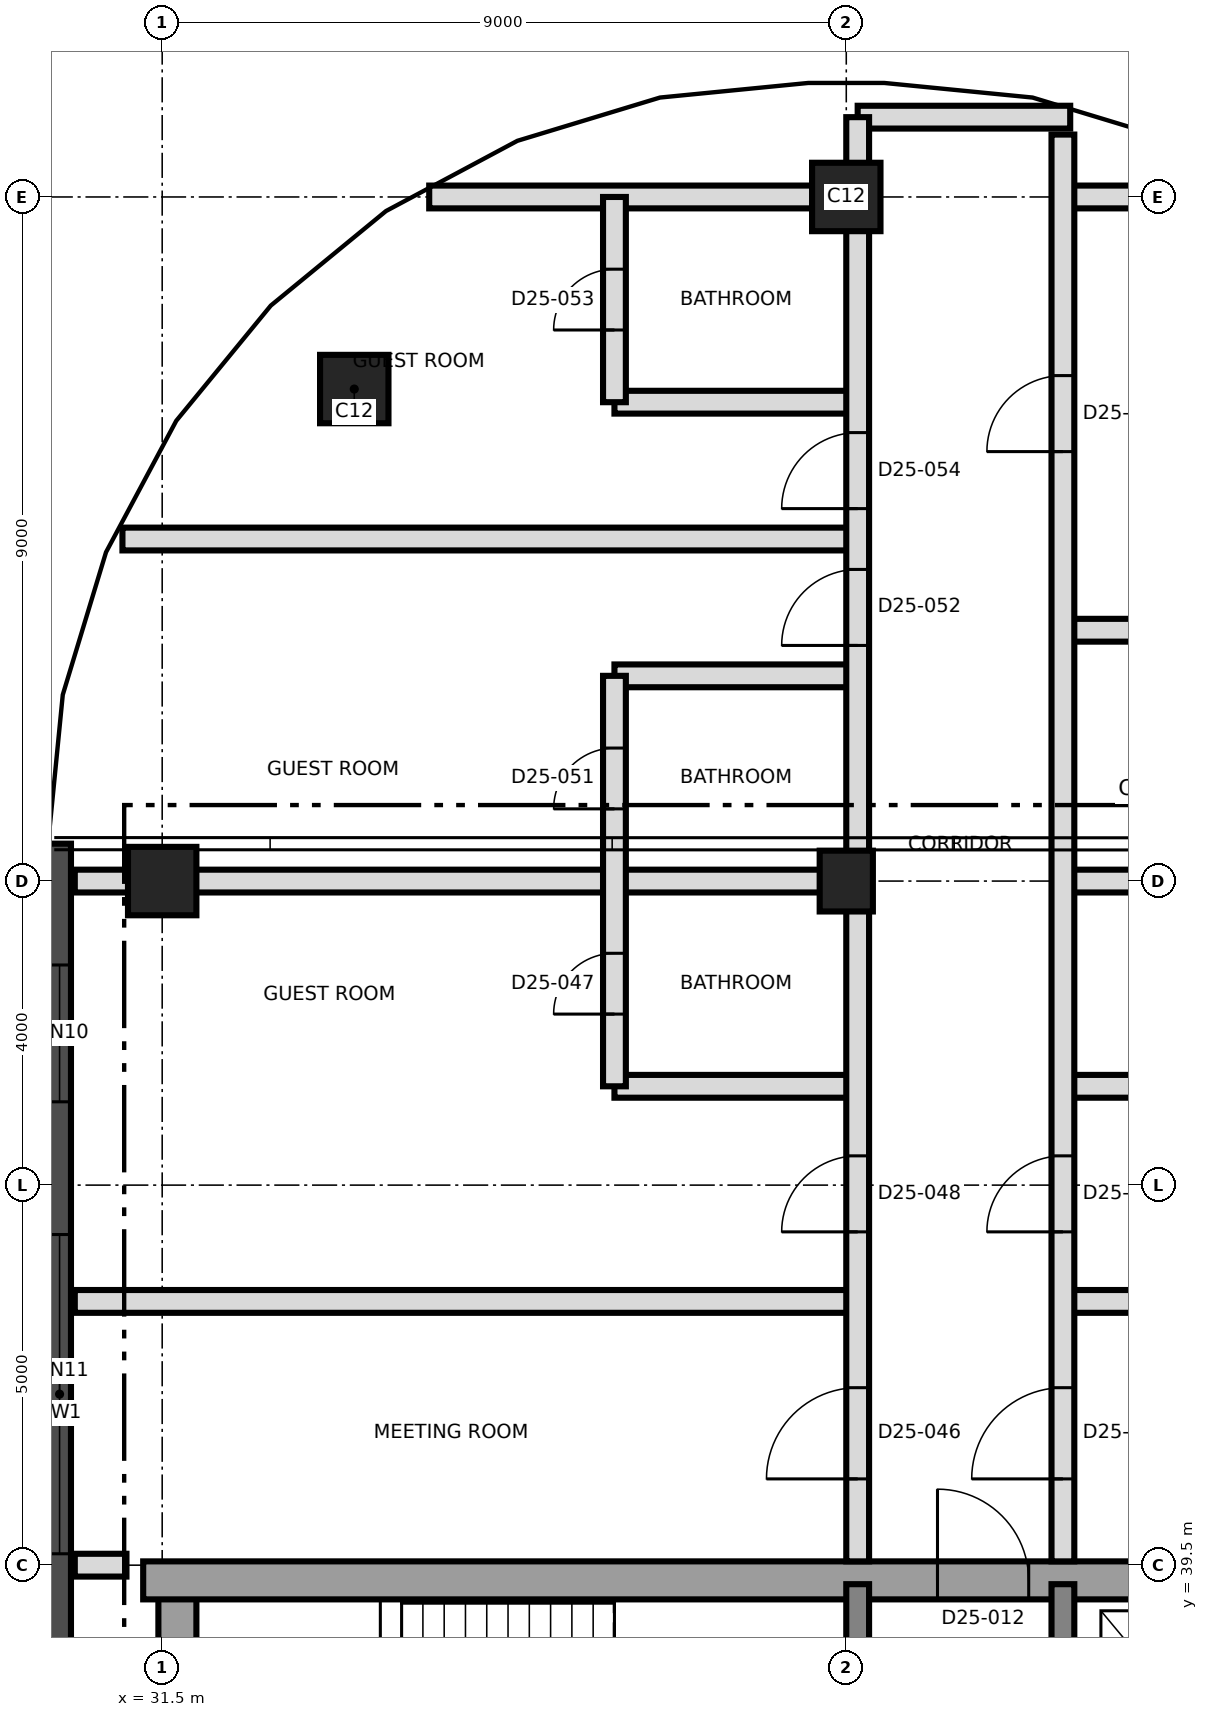
"""IFC4 building model, lengths in metres.
Left out: names, types, materials, properties, quantities, classifications, styles, units other than length and angle.
Written with IfcOpenShell. Run it as: python <this file> out.ifc"""

import sys

from ifc_helpers import new_model, si_unit, direction, frame, frame_2d, origin, origin_2d, place, context, subcontext, project, spatial, rectangle, extrude, element, fill, save


model = new_model("IFC4")
c1 = context("Model", 3, precision=1e-05, world=origin(), true_north=direction((0.0, 1.0)))
c2 = subcontext(c1, "Body", "Model", "MODEL_VIEW")
j1 = project(units=[si_unit("LENGTHUNIT", "METRE"), si_unit("PLANEANGLEUNIT", "RADIAN")], contexts=[c1])
p1 = place(None, origin())
s1 = spatial("IfcSite", under=j1, at=p1, CompositionType="ELEMENT")
p2 = place(p1, origin())
s2 = spatial("IfcBuilding", under=s1, at=p2, CompositionType="ELEMENT")
p3 = place(p2, frame((0.0, 0.0, 225.4)))
s3 = spatial("IfcBuildingStorey", under=s2, at=p3, CompositionType="ELEMENT", Elevation=225.4)
p4 = place(p3, frame((31.7, 21.75, 0.0), z_axis=(0.0, 0.0, 1.0), x_axis=(0.0, 1.0, 0.0)))
e1 = element("IfcWall", 1, at=p4, inside=s3, PredefinedType="SHEAR", context=c2, shape_type="SweptSolid", body=[
    extrude(rectangle(XDim=17.5, YDim=0.5, at=frame_2d((8.75, 0.0))), origin(), (0.0, 0.0, 1.0), 3.7),
])
p5 = place(p3, frame((31.25, 39.3, 0.0), z_axis=(0.0, 0.0, 1.0), x_axis=(1.0, 0.0, 0.0)))
e2 = element("IfcWall", 2, at=p5, inside=s3, PredefinedType="SHEAR", context=c2, shape_type="SweptSolid", body=[
    extrude(rectangle(XDim=27.0, YDim=0.5, at=frame_2d((13.5, 0.0))), origin(), (0.0, 0.0, 1.0), 3.7),
])
p6 = place(p5, frame((10.45, 0.0, 0.0)))
e3 = element("IfcOpeningElement", 3, at=p6, cuts=e2, PredefinedType="OPENING", context=c2, shape_type="SweptSolid", body=[
    extrude(rectangle(XDim=1.2, YDim=2.1, at=frame_2d((0.6, 1.05))), frame((0.0, 0.26, 0.0), z_axis=(0.0, -1.0, 0.0), x_axis=(1.0, 0.0, 0.0)), (0.0, 0.0, 1.0), 0.52),
])
for number, where, z_axis, x_axis in (
    (4, (40.65, 33.5, 0.0), (0.0, 0.0, 1.0), (0.0, 1.0, 0.0)),
    (5, (43.35, 33.5, 0.0), (0.0, 0.0, 1.0), (0.0, 1.0, 0.0)),
):
    element("IfcWall", number, at=place(p3, frame(where, z_axis=z_axis, x_axis=x_axis)), inside=s3, PredefinedType="SHEAR", context=c2, shape_type="SweptSolid", body=[
        extrude(rectangle(XDim=5.75, YDim=0.3, at=frame_2d((2.875, 0.0))), origin(), (0.0, 0.0, 1.0), 3.7),
    ])
p7 = place(p3, frame((31.5, 48.5, 0.0), z_axis=(0.0, 0.0, 1.0), x_axis=(1.0, 0.0, 0.0)))
e6 = element("IfcColumn", 6, at=p7, inside=s3, PredefinedType="COLUMN", context=c2, shape_type="SweptSolid", body=[
    extrude(rectangle(XDim=0.9, YDim=0.9, at=origin_2d()), origin(), (0.0, 0.0, 1.0), 3.7),
])
p8 = place(p3, frame((40.5, 48.5, 0.0), z_axis=(0.0, 0.0, 1.0), x_axis=(0.0, 1.0, 0.0)))
e7 = element("IfcColumn", 7, at=p8, inside=s3, PredefinedType="COLUMN", context=c2, shape_type="SweptSolid", body=[
    extrude(rectangle(XDim=0.8, YDim=0.7, at=origin_2d()), origin(), (0.0, 0.0, 1.0), 3.7),
])
for number, where, z_axis, x_axis in (
    (8, (34.027, 54.973, 0.0), (0.0, 0.0, 1.0), (1.0, 0.0, 0.0)),
    (9, (40.5, 57.5, 0.0), (0.0, 0.0, 1.0), (1.0, 0.0, 0.0)),
):
    element("IfcColumn", number, at=place(p3, frame(where, z_axis=z_axis, x_axis=x_axis)), inside=s3, PredefinedType="COLUMN", context=c2, shape_type="SweptSolid", body=[
        extrude(rectangle(XDim=0.9, YDim=0.9, at=origin_2d()), origin(), (0.0, 0.0, 1.0), 3.7),
    ])
p9 = place(p3, frame((30.15, 48.992, 0.0), z_axis=(0.0, 0.0, 1.0), x_axis=(0.0, -1.0, 0.0)))
e10 = element("IfcWall", 10, at=p9, inside=s3, PredefinedType="SOLIDWALL", context=c2, shape_type="SweptSolid", body=[
    extrude(rectangle(XDim=14.968, YDim=0.3, at=frame_2d((7.484, 0.0))), origin(), (0.0, 0.0, 1.0), 3.4),
])
p10 = place(p9, frame((1.596, 0.0, 0.3)))
e11 = element("IfcOpeningElement", 11, at=p10, cuts=e10, PredefinedType="OPENING", context=c2, shape_type="SweptSolid", body=[
    extrude(rectangle(XDim=1.8, YDim=2.4, at=frame_2d((0.9, 1.2))), frame((0.0, 0.16, 0.0), z_axis=(0.0, -1.0, 0.0), x_axis=(1.0, 0.0, 0.0)), (0.0, 0.0, 1.0), 0.32),
])
p11 = place(p9, frame((5.142, 0.0, 0.9)))
e12 = element("IfcOpeningElement", 12, at=p11, cuts=e10, PredefinedType="OPENING", context=c2, shape_type="SweptSolid", body=[
    extrude(rectangle(XDim=4.2, YDim=1.5, at=frame_2d((2.1, 0.75))), frame((0.0, 0.16, 0.0), z_axis=(0.0, -1.0, 0.0), x_axis=(1.0, 0.0, 0.0)), (0.0, 0.0, 1.0), 0.32),
])
p12 = place(p9, frame((11.33, 0.0, 0.3)))
e13 = element("IfcOpeningElement", 13, at=p12, cuts=e10, PredefinedType="OPENING", context=c2, shape_type="SweptSolid", body=[
    extrude(rectangle(XDim=1.8, YDim=2.4, at=frame_2d((0.9, 1.2))), frame((0.0, 0.16, 0.0), z_axis=(0.0, -1.0, 0.0), x_axis=(1.0, 0.0, 0.0)), (0.0, 0.0, 1.0), 0.32),
])
p13 = place(p3, frame((30.35, 39.5, 0.0), z_axis=(0.0, 0.0, 1.0), x_axis=(1.0, 0.0, 0.0)))
e14 = element("IfcWall", 14, at=p13, inside=s3, PredefinedType="PARTITIONING", context=c2, shape_type="SweptSolid", body=[
    extrude(rectangle(XDim=0.68, YDim=0.3, at=frame_2d((0.34, 0.0))), origin(), (0.0, 0.0, 1.0), 3.4),
])
p14 = place(p3, frame((30.35, 42.97, 0.0), z_axis=(0.0, 0.0, 1.0), x_axis=(1.0, 0.0, 0.0)))
e15 = element("IfcWall", 15, at=p14, inside=s3, PredefinedType="PARTITIONING", context=c2, shape_type="SweptSolid", body=[
    extrude(rectangle(XDim=10.3, YDim=0.3, at=frame_2d((5.15, 0.0))), origin(), (0.0, 0.0, 1.0), 3.4),
])
p15 = place(p3, frame((43.35, 42.97, 0.0), z_axis=(0.0, 0.0, 1.0), x_axis=(1.0, 0.0, 0.0)))
e16 = element("IfcWall", 16, at=p15, inside=s3, PredefinedType="PARTITIONING", context=c2, shape_type="SweptSolid", body=[
    extrude(rectangle(XDim=8.402, YDim=0.3, at=frame_2d((4.201, 0.0))), origin(), (0.0, 0.0, 1.0), 3.4),
])
for number, where, z_axis, x_axis in (
    (17, (37.45, 45.8, 0.0), (0.0, 0.0, 1.0), (1.0, 0.0, 0.0)),
    (18, (43.35, 45.8, 0.0), (0.0, 0.0, 1.0), (1.0, 0.0, 0.0)),
):
    element("IfcWall", number, at=place(p3, frame(where, z_axis=z_axis, x_axis=x_axis)), inside=s3, PredefinedType="PARTITIONING", context=c2, shape_type="SweptSolid", body=[
        extrude(rectangle(XDim=3.2, YDim=0.3, at=frame_2d((1.6, 0.0))), origin(), (0.0, 0.0, 1.0), 3.4),
    ])
p16 = place(p3, frame((30.35, 48.5, 0.0), z_axis=(0.0, 0.0, 1.0), x_axis=(1.0, 0.0, 0.0)))
e19 = element("IfcWall", 19, at=p16, inside=s3, PredefinedType="PARTITIONING", context=c2, shape_type="SweptSolid", body=[
    extrude(rectangle(XDim=10.3, YDim=0.3, at=frame_2d((5.15, 0.0))), origin(), (0.0, 0.0, 1.0), 3.4),
])
p17 = place(p3, frame((43.35, 48.5, 0.0), z_axis=(0.0, 0.0, 1.0), x_axis=(1.0, 0.0, 0.0)))
e20 = element("IfcWall", 20, at=p17, inside=s3, PredefinedType="PARTITIONING", context=c2, shape_type="SweptSolid", body=[
    extrude(rectangle(XDim=7.48, YDim=0.3, at=frame_2d((3.74, 0.0))), origin(), (0.0, 0.0, 1.0), 3.4),
])
p18 = place(p3, frame((37.45, 51.2, 0.0), z_axis=(0.0, 0.0, 1.0), x_axis=(1.0, 0.0, 0.0)))
e21 = element("IfcWall", 21, at=p18, inside=s3, PredefinedType="PARTITIONING", context=c2, shape_type="SweptSolid", body=[
    extrude(rectangle(XDim=3.2, YDim=0.3, at=frame_2d((1.6, 0.0))), origin(), (0.0, 0.0, 1.0), 3.4),
])
p19 = place(p3, frame((43.35, 51.8, 0.0), z_axis=(0.0, 0.0, 1.0), x_axis=(1.0, 0.0, 0.0)))
e22 = element("IfcWall", 22, at=p19, inside=s3, PredefinedType="PARTITIONING", context=c2, shape_type="SweptSolid", body=[
    extrude(rectangle(XDim=3.5, YDim=0.3, at=frame_2d((1.75, 0.0))), origin(), (0.0, 0.0, 1.0), 3.4),
])
p20 = place(p3, frame((30.977, 53.0, 0.0), z_axis=(0.0, 0.0, 1.0), x_axis=(1.0, 0.0, 0.0)))
e23 = element("IfcWall", 23, at=p20, inside=s3, PredefinedType="PARTITIONING", context=c2, shape_type="SweptSolid", body=[
    extrude(rectangle(XDim=9.673, YDim=0.3, at=frame_2d((4.836, 0.0))), origin(), (0.0, 0.0, 1.0), 3.4),
])
p21 = place(p3, frame((37.45, 54.8, 0.0), z_axis=(0.0, 0.0, 1.0), x_axis=(1.0, 0.0, 0.0)))
e24 = element("IfcWall", 24, at=p21, inside=s3, PredefinedType="PARTITIONING", context=c2, shape_type="SweptSolid", body=[
    extrude(rectangle(XDim=3.2, YDim=0.3, at=frame_2d((1.6, 0.0))), origin(), (0.0, 0.0, 1.0), 3.4),
])
p22 = place(p3, frame((35.013, 57.5, 0.0), z_axis=(0.0, 0.0, 1.0), x_axis=(1.0, 0.0, 0.0)))
e25 = element("IfcWall", 25, at=p22, inside=s3, PredefinedType="PARTITIONING", context=c2, shape_type="SweptSolid", body=[
    extrude(rectangle(XDim=5.637, YDim=0.3, at=frame_2d((2.818, 0.0))), origin(), (0.0, 0.0, 1.0), 3.4),
])
p23 = place(p3, frame((43.35, 57.5, 0.0), z_axis=(0.0, 0.0, 1.0), x_axis=(1.0, 0.0, 0.0)))
e26 = element("IfcWall", 26, at=p23, inside=s3, PredefinedType="PARTITIONING", context=c2, shape_type="SweptSolid", body=[
    extrude(rectangle(XDim=2.637, YDim=0.3, at=frame_2d((1.318, 0.0))), origin(), (0.0, 0.0, 1.0), 3.4),
])
p24 = place(p3, frame((40.65, 58.55, 0.0), z_axis=(0.0, 0.0, 1.0), x_axis=(1.0, 0.0, 0.0)))
e27 = element("IfcWall", 27, at=p24, inside=s3, PredefinedType="PARTITIONING", context=c2, shape_type="SweptSolid", body=[
    extrude(rectangle(XDim=2.796, YDim=0.3, at=frame_2d((1.398, 0.0))), origin(), (0.0, 0.0, 1.0), 3.4),
])
p25 = place(p3, frame((37.45, 45.8, 0.0), z_axis=(0.0, 0.0, 1.0), x_axis=(0.0, 1.0, 0.0)))
e28 = element("IfcWall", 28, at=p25, inside=s3, PredefinedType="PARTITIONING", context=c2, shape_type="SweptSolid", body=[
    extrude(rectangle(XDim=5.4, YDim=0.3, at=frame_2d((2.7, 0.0))), origin(), (0.0, 0.0, 1.0), 3.4),
])
p26 = place(p25, frame((0.95, 0.0, 0.0)))
e29 = element("IfcOpeningElement", 29, at=p26, cuts=e28, PredefinedType="OPENING", context=c2, shape_type="SweptSolid", body=[
    extrude(rectangle(XDim=0.8, YDim=2.1, at=frame_2d((0.4, 1.05))), frame((0.0, 0.16, 0.0), z_axis=(0.0, -1.0, 0.0), x_axis=(1.0, 0.0, 0.0)), (0.0, 0.0, 1.0), 0.32),
])
p27 = place(p25, frame((3.65, 0.0, 0.0)))
e30 = element("IfcOpeningElement", 30, at=p27, cuts=e28, PredefinedType="OPENING", context=c2, shape_type="SweptSolid", body=[
    extrude(rectangle(XDim=0.8, YDim=2.1, at=frame_2d((0.4, 1.05))), frame((0.0, 0.16, 0.0), z_axis=(0.0, -1.0, 0.0), x_axis=(1.0, 0.0, 0.0)), (0.0, 0.0, 1.0), 0.32),
])
p28 = place(p3, frame((37.45, 54.8, 0.0), z_axis=(0.0, 0.0, 1.0), x_axis=(0.0, 1.0, 0.0)))
e31 = element("IfcWall", 31, at=p28, inside=s3, PredefinedType="PARTITIONING", context=c2, shape_type="SweptSolid", body=[
    extrude(rectangle(XDim=2.7, YDim=0.3, at=frame_2d((1.35, 0.0))), origin(), (0.0, 0.0, 1.0), 3.4),
])
p29 = place(p28, frame((0.95, 0.0, 0.0)))
e32 = element("IfcOpeningElement", 32, at=p29, cuts=e31, PredefinedType="OPENING", context=c2, shape_type="SweptSolid", body=[
    extrude(rectangle(XDim=0.8, YDim=2.1, at=frame_2d((0.4, 1.05))), frame((0.0, 0.16, 0.0), z_axis=(0.0, -1.0, 0.0), x_axis=(1.0, 0.0, 0.0)), (0.0, 0.0, 1.0), 0.32),
])
p30 = place(p3, frame((40.65, 39.55, 0.0), z_axis=(0.0, 0.0, 1.0), x_axis=(0.0, 1.0, 0.0)))
e33 = element("IfcWall", 33, at=p30, inside=s3, PredefinedType="PARTITIONING", context=c2, shape_type="SweptSolid", body=[
    extrude(rectangle(XDim=19.0, YDim=0.3, at=frame_2d((9.5, 0.0))), origin(), (0.0, 0.0, 1.0), 3.4),
])
p31 = place(p30, frame((1.085, 0.0, 0.0)))
e34 = element("IfcOpeningElement", 34, at=p31, cuts=e33, PredefinedType="OPENING", context=c2, shape_type="SweptSolid", body=[
    extrude(rectangle(XDim=1.2, YDim=2.1, at=frame_2d((0.6, 1.05))), frame((0.0, 0.16, 0.0), z_axis=(0.0, -1.0, 0.0), x_axis=(1.0, 0.0, 0.0)), (0.0, 0.0, 1.0), 0.32),
])
p32 = place(p30, frame((4.335, 0.0, 0.0)))
e35 = element("IfcOpeningElement", 35, at=p32, cuts=e33, PredefinedType="OPENING", context=c2, shape_type="SweptSolid", body=[
    extrude(rectangle(XDim=1.0, YDim=2.1, at=frame_2d((0.5, 1.05))), frame((0.0, 0.16, 0.0), z_axis=(0.0, -1.0, 0.0), x_axis=(1.0, 0.0, 0.0)), (0.0, 0.0, 1.0), 0.32),
])
p33 = place(p30, frame((12.05, 0.0, 0.0)))
e36 = element("IfcOpeningElement", 36, at=p33, cuts=e33, PredefinedType="OPENING", context=c2, shape_type="SweptSolid", body=[
    extrude(rectangle(XDim=1.0, YDim=2.1, at=frame_2d((0.5, 1.05))), frame((0.0, 0.16, 0.0), z_axis=(0.0, -1.0, 0.0), x_axis=(1.0, 0.0, 0.0)), (0.0, 0.0, 1.0), 0.32),
])
p34 = place(p30, frame((13.85, 0.0, 0.0)))
e37 = element("IfcOpeningElement", 37, at=p34, cuts=e33, PredefinedType="OPENING", context=c2, shape_type="SweptSolid", body=[
    extrude(rectangle(XDim=1.0, YDim=2.1, at=frame_2d((0.5, 1.05))), frame((0.0, 0.16, 0.0), z_axis=(0.0, -1.0, 0.0), x_axis=(1.0, 0.0, 0.0)), (0.0, 0.0, 1.0), 0.32),
])
p35 = place(p3, frame((43.35, 39.55, 0.0), z_axis=(0.0, 0.0, 1.0), x_axis=(0.0, 1.0, 0.0)))
e38 = element("IfcWall", 38, at=p35, inside=s3, PredefinedType="PARTITIONING", context=c2, shape_type="SweptSolid", body=[
    extrude(rectangle(XDim=18.771, YDim=0.3, at=frame_2d((9.385, 0.0))), origin(), (0.0, 0.0, 1.0), 3.4),
])
p36 = place(p35, frame((1.085, 0.0, 0.0)))
e39 = element("IfcOpeningElement", 39, at=p36, cuts=e38, PredefinedType="OPENING", context=c2, shape_type="SweptSolid", body=[
    extrude(rectangle(XDim=1.2, YDim=2.1, at=frame_2d((0.6, 1.05))), frame((0.0, 0.16, 0.0), z_axis=(0.0, -1.0, 0.0), x_axis=(1.0, 0.0, 0.0)), (0.0, 0.0, 1.0), 0.32),
])
p37 = place(p35, frame((4.335, 0.0, 0.0)))
e40 = element("IfcOpeningElement", 40, at=p37, cuts=e38, PredefinedType="OPENING", context=c2, shape_type="SweptSolid", body=[
    extrude(rectangle(XDim=1.0, YDim=2.1, at=frame_2d((0.5, 1.05))), frame((0.0, 0.16, 0.0), z_axis=(0.0, -1.0, 0.0), x_axis=(1.0, 0.0, 0.0)), (0.0, 0.0, 1.0), 0.32),
])
p38 = place(p35, frame((14.6, 0.0, 0.0)))
e41 = element("IfcOpeningElement", 41, at=p38, cuts=e38, PredefinedType="OPENING", context=c2, shape_type="SweptSolid", body=[
    extrude(rectangle(XDim=1.0, YDim=2.4, at=frame_2d((0.5, 1.2))), frame((0.0, 0.16, 0.0), z_axis=(0.0, -1.0, 0.0), x_axis=(1.0, 0.0, 0.0)), (0.0, 0.0, 1.0), 0.32),
])
p39 = place(p10, origin())
e42 = element("IfcWindow", 42, at=p39, inside=s3, PartitioningType="SINGLE_PANEL", PredefinedType="WINDOW", context=c2, shape_type="SweptSolid", body=[
    extrude(rectangle(XDim=1.8, YDim=2.4, at=frame_2d((0.9, 1.2))), frame((0.0, 0.03, 0.0), z_axis=(0.0, -1.0, 0.0), x_axis=(1.0, 0.0, 0.0)), (0.0, 0.0, 1.0), 0.06),
])
fill(e11, e42)
p40 = place(p11, origin())
e43 = element("IfcWindow", 43, at=p40, inside=s3, PartitioningType="SINGLE_PANEL", PredefinedType="WINDOW", context=c2, shape_type="SweptSolid", body=[
    extrude(rectangle(XDim=4.2, YDim=1.5, at=frame_2d((2.1, 0.75))), frame((0.0, 0.03, 0.0), z_axis=(0.0, -1.0, 0.0), x_axis=(1.0, 0.0, 0.0)), (0.0, 0.0, 1.0), 0.06),
])
fill(e12, e43)
p41 = place(p6, origin())
e44 = element("IfcDoor", 44, at=p41, inside=s3, OperationType="SINGLE_SWING_RIGHT", PredefinedType="DOOR", context=c2, shape_type="SweptSolid", body=[
    extrude(rectangle(XDim=1.2, YDim=2.1, at=frame_2d((0.6, 1.05))), frame((0.0, 0.025, 0.0), z_axis=(0.0, -1.0, 0.0), x_axis=(1.0, 0.0, 0.0)), (0.0, 0.0, 1.0), 0.05),
])
fill(e3, e44)
p42 = place(p36, origin())
e45 = element("IfcDoor", 45, at=p42, inside=s3, OperationType="SINGLE_SWING_RIGHT", PredefinedType="DOOR", context=c2, shape_type="SweptSolid", body=[
    extrude(rectangle(XDim=1.2, YDim=2.1, at=frame_2d((0.6, 1.05))), frame((0.0, 0.025, 0.0), z_axis=(0.0, -1.0, 0.0), x_axis=(1.0, 0.0, 0.0)), (0.0, 0.0, 1.0), 0.05),
])
fill(e39, e45)
p43 = place(p37, origin())
e46 = element("IfcDoor", 46, at=p43, inside=s3, OperationType="SINGLE_SWING_LEFT", PredefinedType="DOOR", context=c2, shape_type="SweptSolid", body=[
    extrude(rectangle(XDim=1.0, YDim=2.1, at=frame_2d((0.5, 1.05))), frame((0.0, 0.025, 0.0), z_axis=(0.0, -1.0, 0.0), x_axis=(1.0, 0.0, 0.0)), (0.0, 0.0, 1.0), 0.05),
])
fill(e40, e46)
p44 = place(p31, origin())
e47 = element("IfcDoor", 47, at=p44, inside=s3, OperationType="SINGLE_SWING_RIGHT", PredefinedType="DOOR", context=c2, shape_type="SweptSolid", body=[
    extrude(rectangle(XDim=1.2, YDim=2.1, at=frame_2d((0.6, 1.05))), frame((0.0, 0.025, 0.0), z_axis=(0.0, -1.0, 0.0), x_axis=(1.0, 0.0, 0.0)), (0.0, 0.0, 1.0), 0.05),
])
fill(e34, e47)
p45 = place(p26, origin())
e48 = element("IfcDoor", 48, at=p45, inside=s3, OperationType="SINGLE_SWING_LEFT", PredefinedType="DOOR", context=c2, shape_type="SweptSolid", body=[
    extrude(rectangle(XDim=0.8, YDim=2.1, at=frame_2d((0.4, 1.05))), frame((0.0, 0.025, 0.0), z_axis=(0.0, -1.0, 0.0), x_axis=(1.0, 0.0, 0.0)), (0.0, 0.0, 1.0), 0.05),
])
fill(e29, e48)
p46 = place(p32, origin())
e49 = element("IfcDoor", 49, at=p46, inside=s3, OperationType="SINGLE_SWING_LEFT", PredefinedType="DOOR", context=c2, shape_type="SweptSolid", body=[
    extrude(rectangle(XDim=1.0, YDim=2.1, at=frame_2d((0.5, 1.05))), frame((0.0, 0.025, 0.0), z_axis=(0.0, -1.0, 0.0), x_axis=(1.0, 0.0, 0.0)), (0.0, 0.0, 1.0), 0.05),
])
fill(e35, e49)
p47 = place(p38, origin())
e50 = element("IfcDoor", 50, at=p47, inside=s3, OperationType="SINGLE_SWING_RIGHT", PredefinedType="DOOR", context=c2, shape_type="SweptSolid", body=[
    extrude(rectangle(XDim=1.0, YDim=2.4, at=frame_2d((0.5, 1.2))), frame((0.0, 0.025, 0.0), z_axis=(0.0, -1.0, 0.0), x_axis=(1.0, 0.0, 0.0)), (0.0, 0.0, 1.0), 0.05),
])
fill(e41, e50)
p48 = place(p27, origin())
e51 = element("IfcDoor", 51, at=p48, inside=s3, OperationType="SINGLE_SWING_RIGHT", PredefinedType="DOOR", context=c2, shape_type="SweptSolid", body=[
    extrude(rectangle(XDim=0.8, YDim=2.1, at=frame_2d((0.4, 1.05))), frame((0.0, 0.025, 0.0), z_axis=(0.0, -1.0, 0.0), x_axis=(1.0, 0.0, 0.0)), (0.0, 0.0, 1.0), 0.05),
])
fill(e30, e51)
p49 = place(p33, origin())
e52 = element("IfcDoor", 52, at=p49, inside=s3, OperationType="SINGLE_SWING_LEFT", PredefinedType="DOOR", context=c2, shape_type="SweptSolid", body=[
    extrude(rectangle(XDim=1.0, YDim=2.1, at=frame_2d((0.5, 1.05))), frame((0.0, 0.025, 0.0), z_axis=(0.0, -1.0, 0.0), x_axis=(1.0, 0.0, 0.0)), (0.0, 0.0, 1.0), 0.05),
])
fill(e36, e52)
p50 = place(p29, origin())
e53 = element("IfcDoor", 53, at=p50, inside=s3, OperationType="SINGLE_SWING_LEFT", PredefinedType="DOOR", context=c2, shape_type="SweptSolid", body=[
    extrude(rectangle(XDim=0.8, YDim=2.1, at=frame_2d((0.4, 1.05))), frame((0.0, 0.025, 0.0), z_axis=(0.0, -1.0, 0.0), x_axis=(1.0, 0.0, 0.0)), (0.0, 0.0, 1.0), 0.05),
])
fill(e32, e53)
p51 = place(p34, origin())
e54 = element("IfcDoor", 54, at=p51, inside=s3, OperationType="SINGLE_SWING_LEFT", PredefinedType="DOOR", context=c2, shape_type="SweptSolid", body=[
    extrude(rectangle(XDim=1.0, YDim=2.1, at=frame_2d((0.5, 1.05))), frame((0.0, 0.025, 0.0), z_axis=(0.0, -1.0, 0.0), x_axis=(1.0, 0.0, 0.0)), (0.0, 0.0, 1.0), 0.05),
])
fill(e37, e54)
save(model, sys.argv[1])
